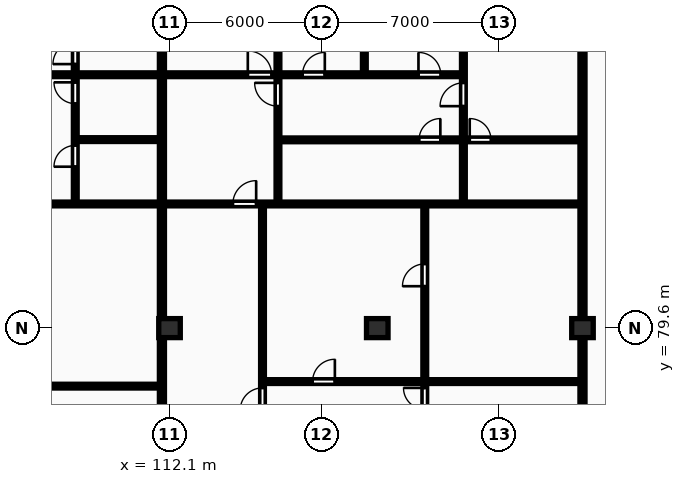
"""IFC4 building model, lengths in metres.
Left out: names, types, materials, properties, quantities, classifications, styles, units other than length and angle.
Written with IfcOpenShell. Run it as: python <this file> out.ifc"""

import sys

from ifc_helpers import new_model, si_unit, direction, frame, frame_2d, origin, origin_2d, place, context, subcontext, project, spatial, rectangle, extrude, element, fill, save


model = new_model("IFC4")
c1 = context("Model", 3, precision=1e-05, world=origin(), true_north=direction((0.0, 1.0)))
c2 = subcontext(c1, "Body", "Model", "MODEL_VIEW")
j1 = project(units=[si_unit("LENGTHUNIT", "METRE"), si_unit("PLANEANGLEUNIT", "RADIAN")], contexts=[c1])
p1 = place(None, origin())
s1 = spatial("IfcSite", under=j1, at=p1, CompositionType="ELEMENT")
p2 = place(p1, origin())
s2 = spatial("IfcBuilding", under=s1, at=p2, CompositionType="ELEMENT")
p3 = place(p2, frame((0.0, 0.0, 210.85)))
s3 = spatial("IfcBuildingStorey", under=s2, at=p3, CompositionType="ELEMENT", Elevation=210.85)
for number, where, z_axis, x_axis in (
    (1, (112.1, 79.6, 0.0), (0.0, 0.0, 1.0), (1.0, 0.0, 0.0)),
    (2, (120.3, 79.6, 0.0), (0.0, 0.0, 1.0), (1.0, 0.0, 0.0)),
    (3, (128.4, 79.6, 0.0), (0.0, 0.0, 1.0), (1.0, 0.0, 0.0)),
):
    element("IfcColumn", number, at=place(p3, frame(where, z_axis=z_axis, x_axis=x_axis)), inside=s3, PredefinedType="COLUMN", context=c2, shape_type="SweptSolid", body=[
        extrude(rectangle(XDim=0.85, YDim=0.75, at=origin_2d()), origin(), (0.0, 0.0, 1.0), 3.25),
    ])
p4 = place(p3, frame((128.4, 70.18, 0.0), z_axis=(0.0, 0.0, 1.0), x_axis=(0.0, 1.0, 0.0)))
e4 = element("IfcWall", 4, at=p4, inside=s3, PredefinedType="PARTITIONING", context=c2, shape_type="SweptSolid", body=[
    extrude(rectangle(XDim=24.32, YDim=0.2, at=frame_2d((12.16, 0.0))), origin(), (0.0, 0.0, 1.0), 2.277),
])
p5 = place(p3, frame((111.8, 70.18, 0.0), z_axis=(0.0, 0.0, 1.0), x_axis=(0.0, 1.0, 0.0)))
e5 = element("IfcWall", 5, at=p5, inside=s3, PredefinedType="PARTITIONING", context=c2, shape_type="SweptSolid", body=[
    extrude(rectangle(XDim=24.32, YDim=0.2, at=frame_2d((12.16, 0.0))), origin(), (0.0, 0.0, 1.0), 2.97),
])
p6 = place(p3, frame((102.766, 77.31, 0.0), z_axis=(0.0, 0.0, 1.0), x_axis=(1.0, 0.0, 0.0)))
e6 = element("IfcWall", 6, at=p6, inside=s3, PredefinedType="PARTITIONING", context=c2, shape_type="SweptSolid", body=[
    extrude(rectangle(XDim=8.954, YDim=0.15, at=frame_2d((4.477, 0.0))), origin(), (0.0, 0.0, 1.0), 2.97),
])
p7 = place(p6, frame((3.257, 0.0, 0.0)))
e7 = element("IfcOpeningElement", 7, at=p7, cuts=e6, PredefinedType="OPENING", context=c2, shape_type="SweptSolid", body=[
    extrude(rectangle(XDim=0.88, YDim=2.06, at=frame_2d((0.44, 1.03))), frame((0.0, 0.085, 0.0), z_axis=(0.0, -1.0, 0.0), x_axis=(1.0, 0.0, 0.0)), (0.0, 0.0, 1.0), 0.17),
])
p8 = place(p3, frame((108.44, 87.04, 0.0), z_axis=(0.0, 0.0, 1.0), x_axis=(1.0, 0.0, 0.0)))
e8 = element("IfcWall", 8, at=p8, inside=s3, PredefinedType="PARTITIONING", context=c2, shape_type="SweptSolid", body=[
    extrude(rectangle(XDim=3.28, YDim=0.15, at=frame_2d((1.64, 0.0))), origin(), (0.0, 0.0, 1.0), 2.97),
])
p9 = place(p3, frame((108.38, 84.54, 0.0), z_axis=(0.0, 0.0, 1.0), x_axis=(0.0, 1.0, 0.0)))
e9 = element("IfcWall", 9, at=p9, inside=s3, PredefinedType="PARTITIONING", context=c2, shape_type="SweptSolid", body=[
    extrude(rectangle(XDim=9.96, YDim=0.15, at=frame_2d((4.98, 0.0))), origin(), (0.0, 0.0, 1.0), 2.97),
])
p10 = place(p9, frame((1.43, 0.0, 0.0)))
e10 = element("IfcOpeningElement", 10, at=p10, cuts=e9, PredefinedType="OPENING", context=c2, shape_type="SweptSolid", body=[
    extrude(rectangle(XDim=0.84, YDim=2.04, at=frame_2d((0.42, 1.02))), frame((0.0, 0.085, 0.0), z_axis=(0.0, -1.0, 0.0), x_axis=(1.0, 0.0, 0.0)), (0.0, 0.0, 1.0), 0.17),
])
p11 = place(p9, frame((3.92, 0.0, 0.0)))
e11 = element("IfcOpeningElement", 11, at=p11, cuts=e9, PredefinedType="OPENING", context=c2, shape_type="SweptSolid", body=[
    extrude(rectangle(XDim=0.84, YDim=2.04, at=frame_2d((0.42, 1.02))), frame((0.0, 0.085, 0.0), z_axis=(0.0, -1.0, 0.0), x_axis=(1.0, 0.0, 0.0)), (0.0, 0.0, 1.0), 0.17),
])
p12 = place(p9, frame((5.48, 0.0, 0.0)))
e12 = element("IfcOpeningElement", 12, at=p12, cuts=e9, PredefinedType="OPENING", context=c2, shape_type="SweptSolid", body=[
    extrude(rectangle(XDim=0.88, YDim=2.06, at=frame_2d((0.44, 1.03))), frame((0.0, 0.085, 0.0), z_axis=(0.0, -1.0, 0.0), x_axis=(1.0, 0.0, 0.0)), (0.0, 0.0, 1.0), 0.17),
])
p13 = place(p3, frame((98.816, 84.5, 0.0), z_axis=(0.0, 0.0, 1.0), x_axis=(1.0, 0.0, 0.0)))
e13 = element("IfcWall", 13, at=p13, inside=s3, PredefinedType="PARTITIONING", context=c2, shape_type="SweptSolid", body=[
    extrude(rectangle(XDim=12.904, YDim=0.15, at=frame_2d((6.452, 0.0))), origin(), (0.0, 0.0, 1.0), 2.97),
])
p14 = place(p13, frame((2.72, 0.0, 0.0)))
e14 = element("IfcOpeningElement", 14, at=p14, cuts=e13, PredefinedType="OPENING", context=c2, shape_type="SweptSolid", body=[
    extrude(rectangle(XDim=0.92, YDim=2.08, at=frame_2d((0.46, 1.04))), frame((0.0, 0.085, 0.0), z_axis=(0.0, -1.0, 0.0), x_axis=(1.0, 0.0, 0.0)), (0.0, 0.0, 1.0), 0.17),
])
p15 = place(p3, frame((98.816, 89.6, 0.0), z_axis=(0.0, 0.0, 1.0), x_axis=(1.0, 0.0, 0.0)))
e15 = element("IfcWall", 15, at=p15, inside=s3, PredefinedType="PARTITIONING", context=c2, shape_type="SweptSolid", body=[
    extrude(rectangle(XDim=12.904, YDim=0.15, at=frame_2d((6.452, 0.0))), origin(), (0.0, 0.0, 1.0), 2.97),
])
p16 = place(p15, frame((5.982, 0.0, 0.0)))
e16 = element("IfcOpeningElement", 16, at=p16, cuts=e15, PredefinedType="OPENING", context=c2, shape_type="SweptSolid", body=[
    extrude(rectangle(XDim=0.94, YDim=2.1, at=frame_2d((0.47, 1.05))), frame((0.0, 0.085, 0.0), z_axis=(0.0, -1.0, 0.0), x_axis=(1.0, 0.0, 0.0)), (0.0, 0.0, 1.0), 0.17),
])
p17 = place(p3, frame((122.175, 70.16, 0.0), z_axis=(0.0, 0.0, 1.0), x_axis=(0.0, 1.0, 0.0)))
e17 = element("IfcWall", 17, at=p17, inside=s3, PredefinedType="PARTITIONING", context=c2, shape_type="SweptSolid", body=[
    extrude(rectangle(XDim=14.3, YDim=0.15, at=frame_2d((7.15, 0.0))), origin(), (0.0, 0.0, 1.0), 2.97),
])
p18 = place(p17, frame((6.24, 0.0, 0.0)))
e18 = element("IfcOpeningElement", 18, at=p18, cuts=e17, PredefinedType="OPENING", context=c2, shape_type="SweptSolid", body=[
    extrude(rectangle(XDim=0.84, YDim=2.04, at=frame_2d((0.42, 1.02))), frame((0.0, 0.085, 0.0), z_axis=(0.0, -1.0, 0.0), x_axis=(1.0, 0.0, 0.0)), (0.0, 0.0, 1.0), 0.17),
])
p19 = place(p17, frame((11.094, 0.0, 0.0)))
e19 = element("IfcOpeningElement", 19, at=p19, cuts=e17, PredefinedType="OPENING", context=c2, shape_type="SweptSolid", body=[
    extrude(rectangle(XDim=0.88, YDim=2.06, at=frame_2d((0.44, 1.03))), frame((0.0, 0.085, 0.0), z_axis=(0.0, -1.0, 0.0), x_axis=(1.0, 0.0, 0.0)), (0.0, 0.0, 1.0), 0.17),
])
p20 = place(p3, frame((115.83, 77.49, 0.0), z_axis=(0.0, 0.0, 1.0), x_axis=(1.0, 0.0, 0.0)))
e20 = element("IfcWall", 20, at=p20, inside=s3, PredefinedType="PARTITIONING", context=c2, shape_type="SweptSolid", body=[
    extrude(rectangle(XDim=12.49, YDim=0.15, at=frame_2d((6.245, 0.0))), origin(), (0.0, 0.0, 1.0), 2.97),
])
p21 = place(p20, frame((1.917, 0.0, 0.0)))
e21 = element("IfcOpeningElement", 21, at=p21, cuts=e20, PredefinedType="OPENING", context=c2, shape_type="SweptSolid", body=[
    extrude(rectangle(XDim=0.88, YDim=2.06, at=frame_2d((0.44, 1.03))), frame((0.0, 0.085, 0.0), z_axis=(0.0, -1.0, 0.0), x_axis=(1.0, 0.0, 0.0)), (0.0, 0.0, 1.0), 0.17),
])
p22 = place(p3, frame((115.77, 70.16, 0.0), z_axis=(0.0, 0.0, 1.0), x_axis=(0.0, 1.0, 0.0)))
e22 = element("IfcWall", 22, at=p22, inside=s3, PredefinedType="PARTITIONING", context=c2, shape_type="SweptSolid", body=[
    extrude(rectangle(XDim=14.3, YDim=0.15, at=frame_2d((7.15, 0.0))), origin(), (0.0, 0.0, 1.0), 2.97),
])
p23 = place(p22, frame((6.2, 0.0, 0.0)))
e23 = element("IfcOpeningElement", 23, at=p23, cuts=e22, PredefinedType="OPENING", context=c2, shape_type="SweptSolid", body=[
    extrude(rectangle(XDim=0.88, YDim=2.06, at=frame_2d((0.44, 1.03))), frame((0.0, 0.085, 0.0), z_axis=(0.0, -1.0, 0.0), x_axis=(1.0, 0.0, 0.0)), (0.0, 0.0, 1.0), 0.17),
])
p24 = place(p3, frame((119.79, 89.68, 0.0), z_axis=(0.0, 0.0, 1.0), x_axis=(0.0, 1.0, 0.0)))
e24 = element("IfcWall", 24, at=p24, inside=s3, PredefinedType="PARTITIONING", context=c2, shape_type="SweptSolid", body=[
    extrude(rectangle(XDim=4.82, YDim=0.15, at=frame_2d((2.41, 0.0))), origin(), (0.0, 0.0, 1.0), 2.97),
])
p25 = place(p3, frame((116.38, 84.54, 0.0), z_axis=(0.0, 0.0, 1.0), x_axis=(0.0, 1.0, 0.0)))
e25 = element("IfcWall", 25, at=p25, inside=s3, PredefinedType="PARTITIONING", context=c2, shape_type="SweptSolid", body=[
    extrude(rectangle(XDim=9.96, YDim=0.15, at=frame_2d((4.98, 0.0))), origin(), (0.0, 0.0, 1.0), 2.97),
])
p26 = place(p25, frame((3.82, 0.0, 0.0)))
e26 = element("IfcOpeningElement", 26, at=p26, cuts=e25, PredefinedType="OPENING", context=c2, shape_type="SweptSolid", body=[
    extrude(rectangle(XDim=0.92, YDim=2.08, at=frame_2d((0.46, 1.04))), frame((0.0, 0.085, 0.0), z_axis=(0.0, -1.0, 0.0), x_axis=(1.0, 0.0, 0.0)), (0.0, 0.0, 1.0), 0.17),
])
p27 = place(p3, frame((123.699, 84.54, 0.0), z_axis=(0.0, 0.0, 1.0), x_axis=(0.0, 1.0, 0.0)))
e27 = element("IfcWall", 27, at=p27, inside=s3, PredefinedType="PARTITIONING", context=c2, shape_type="SweptSolid", body=[
    extrude(rectangle(XDim=2.47, YDim=0.15, at=frame_2d((1.235, 0.0))), origin(), (0.0, 0.0, 1.0), 2.97),
])
p28 = place(p3, frame((123.699, 87.05, 0.0), z_axis=(0.0, 0.0, 1.0), x_axis=(0.0, 1.0, 0.0)))
e28 = element("IfcWall", 28, at=p28, inside=s3, PredefinedType="PARTITIONING", context=c2, shape_type="SweptSolid", body=[
    extrude(rectangle(XDim=7.45, YDim=0.15, at=frame_2d((3.725, 0.0))), origin(), (0.0, 0.0, 1.0), 2.97),
])
p29 = place(p28, frame((1.31, 0.0, 0.0)))
e29 = element("IfcOpeningElement", 29, at=p29, cuts=e28, PredefinedType="OPENING", context=c2, shape_type="SweptSolid", body=[
    extrude(rectangle(XDim=0.92, YDim=2.08, at=frame_2d((0.46, 1.04))), frame((0.0, 0.085, 0.0), z_axis=(0.0, -1.0, 0.0), x_axis=(1.0, 0.0, 0.0)), (0.0, 0.0, 1.0), 0.17),
])
p30 = place(p3, frame((116.42, 87.03, 0.0), z_axis=(0.0, 0.0, 1.0), x_axis=(1.0, 0.0, 0.0)))
e30 = element("IfcWall", 30, at=p30, inside=s3, PredefinedType="PARTITIONING", context=c2, shape_type="SweptSolid", body=[
    extrude(rectangle(XDim=11.9, YDim=0.15, at=frame_2d((5.95, 0.0))), origin(), (0.0, 0.0, 1.0), 2.97),
])
p31 = place(p30, frame((5.53, 0.0, 0.0)))
e31 = element("IfcOpeningElement", 31, at=p31, cuts=e30, PredefinedType="OPENING", context=c2, shape_type="SweptSolid", body=[
    extrude(rectangle(XDim=0.84, YDim=2.04, at=frame_2d((0.42, 1.02))), frame((0.0, 0.085, 0.0), z_axis=(0.0, -1.0, 0.0), x_axis=(1.0, 0.0, 0.0)), (0.0, 0.0, 1.0), 0.17),
])
p32 = place(p30, frame((7.529, 0.0, 0.0)))
e32 = element("IfcOpeningElement", 32, at=p32, cuts=e30, PredefinedType="OPENING", context=c2, shape_type="SweptSolid", body=[
    extrude(rectangle(XDim=0.84, YDim=2.04, at=frame_2d((0.42, 1.02))), frame((0.0, 0.085, 0.0), z_axis=(0.0, -1.0, 0.0), x_axis=(1.0, 0.0, 0.0)), (0.0, 0.0, 1.0), 0.17),
])
p33 = place(p3, frame((111.88, 84.5, 0.0), z_axis=(0.0, 0.0, 1.0), x_axis=(1.0, 0.0, 0.0)))
e33 = element("IfcWall", 33, at=p33, inside=s3, PredefinedType="PARTITIONING", context=c2, shape_type="SweptSolid", body=[
    extrude(rectangle(XDim=16.44, YDim=0.15, at=frame_2d((8.22, 0.0))), origin(), (0.0, 0.0, 1.0), 2.97),
])
p34 = place(p33, frame((2.72, 0.0, 0.0)))
e34 = element("IfcOpeningElement", 34, at=p34, cuts=e33, PredefinedType="OPENING", context=c2, shape_type="SweptSolid", body=[
    extrude(rectangle(XDim=0.92, YDim=2.08, at=frame_2d((0.46, 1.04))), frame((0.0, 0.085, 0.0), z_axis=(0.0, -1.0, 0.0), x_axis=(1.0, 0.0, 0.0)), (0.0, 0.0, 1.0), 0.17),
])
p35 = place(p3, frame((111.88, 89.6, 0.0), z_axis=(0.0, 0.0, 1.0), x_axis=(1.0, 0.0, 0.0)))
e35 = element("IfcWall", 35, at=p35, inside=s3, PredefinedType="PARTITIONING", context=c2, shape_type="SweptSolid", body=[
    extrude(rectangle(XDim=11.819, YDim=0.15, at=frame_2d((5.91, 0.0))), origin(), (0.0, 0.0, 1.0), 2.97),
])
p36 = place(p35, frame((3.31, 0.0, 0.0)))
e36 = element("IfcOpeningElement", 36, at=p36, cuts=e35, PredefinedType="OPENING", context=c2, shape_type="SweptSolid", body=[
    extrude(rectangle(XDim=0.94, YDim=2.1, at=frame_2d((0.47, 1.05))), frame((0.0, 0.085, 0.0), z_axis=(0.0, -1.0, 0.0), x_axis=(1.0, 0.0, 0.0)), (0.0, 0.0, 1.0), 0.17),
])
p37 = place(p35, frame((5.469, 0.0, 0.0)))
e37 = element("IfcOpeningElement", 37, at=p37, cuts=e35, PredefinedType="OPENING", context=c2, shape_type="SweptSolid", body=[
    extrude(rectangle(XDim=0.88, YDim=2.06, at=frame_2d((0.44, 1.03))), frame((0.0, 0.085, 0.0), z_axis=(0.0, -1.0, 0.0), x_axis=(1.0, 0.0, 0.0)), (0.0, 0.0, 1.0), 0.17),
])
p38 = place(p35, frame((10.046, 0.0, 0.0)))
e38 = element("IfcOpeningElement", 38, at=p38, cuts=e35, PredefinedType="OPENING", context=c2, shape_type="SweptSolid", body=[
    extrude(rectangle(XDim=0.88, YDim=2.06, at=frame_2d((0.44, 1.03))), frame((0.0, 0.085, 0.0), z_axis=(0.0, -1.0, 0.0), x_axis=(1.0, 0.0, 0.0)), (0.0, 0.0, 1.0), 0.17),
])
p39 = place(p10, origin())
e39 = element("IfcDoor", 39, at=p39, inside=s3, OperationType="SINGLE_SWING_LEFT", PredefinedType="DOOR", context=c2, shape_type="SweptSolid", body=[
    extrude(rectangle(XDim=0.84, YDim=2.04, at=frame_2d((0.42, 1.02))), frame((0.0, 0.025, 0.0), z_axis=(0.0, -1.0, 0.0), x_axis=(1.0, 0.0, 0.0)), (0.0, 0.0, 1.0), 0.05),
])
fill(e10, e39)
p40 = place(p11, origin())
e40 = element("IfcDoor", 40, at=p40, inside=s3, OperationType="SINGLE_SWING_RIGHT", PredefinedType="DOOR", context=c2, shape_type="SweptSolid", body=[
    extrude(rectangle(XDim=0.84, YDim=2.04, at=frame_2d((0.42, 1.02))), frame((0.0, 0.025, 0.0), z_axis=(0.0, -1.0, 0.0), x_axis=(1.0, 0.0, 0.0)), (0.0, 0.0, 1.0), 0.05),
])
fill(e11, e40)
p41 = place(p12, origin())
e41 = element("IfcDoor", 41, at=p41, inside=s3, OperationType="SINGLE_SWING_LEFT", PredefinedType="DOOR", context=c2, shape_type="SweptSolid", body=[
    extrude(rectangle(XDim=0.88, YDim=2.06, at=frame_2d((0.44, 1.03))), frame((0.0, 0.025, 0.0), z_axis=(0.0, -1.0, 0.0), x_axis=(1.0, 0.0, 0.0)), (0.0, 0.0, 1.0), 0.05),
])
fill(e12, e41)
p42 = place(p18, origin())
e42 = element("IfcDoor", 42, at=p42, inside=s3, OperationType="SINGLE_SWING_RIGHT", PredefinedType="DOOR", context=c2, shape_type="SweptSolid", body=[
    extrude(rectangle(XDim=0.84, YDim=2.04, at=frame_2d((0.42, 1.02))), frame((0.0, 0.025, 0.0), z_axis=(0.0, -1.0, 0.0), x_axis=(1.0, 0.0, 0.0)), (0.0, 0.0, 1.0), 0.05),
])
fill(e18, e42)
p43 = place(p19, origin())
e43 = element("IfcDoor", 43, at=p43, inside=s3, OperationType="SINGLE_SWING_LEFT", PredefinedType="DOOR", context=c2, shape_type="SweptSolid", body=[
    extrude(rectangle(XDim=0.88, YDim=2.06, at=frame_2d((0.44, 1.03))), frame((0.0, 0.025, 0.0), z_axis=(0.0, -1.0, 0.0), x_axis=(1.0, 0.0, 0.0)), (0.0, 0.0, 1.0), 0.05),
])
fill(e19, e43)
p44 = place(p21, origin())
e44 = element("IfcDoor", 44, at=p44, inside=s3, OperationType="SINGLE_SWING_RIGHT", PredefinedType="DOOR", context=c2, shape_type="SweptSolid", body=[
    extrude(rectangle(XDim=0.88, YDim=2.06, at=frame_2d((0.44, 1.03))), frame((0.0, 0.025, 0.0), z_axis=(0.0, -1.0, 0.0), x_axis=(1.0, 0.0, 0.0)), (0.0, 0.0, 1.0), 0.05),
])
fill(e21, e44)
p45 = place(p23, origin())
e45 = element("IfcDoor", 45, at=p45, inside=s3, OperationType="SINGLE_SWING_LEFT", PredefinedType="DOOR", context=c2, shape_type="SweptSolid", body=[
    extrude(rectangle(XDim=0.88, YDim=2.06, at=frame_2d((0.44, 1.03))), frame((0.0, 0.025, 0.0), z_axis=(0.0, -1.0, 0.0), x_axis=(1.0, 0.0, 0.0)), (0.0, 0.0, 1.0), 0.05),
])
fill(e23, e45)
p46 = place(p26, origin())
e46 = element("IfcDoor", 46, at=p46, inside=s3, OperationType="SINGLE_SWING_RIGHT", PredefinedType="DOOR", context=c2, shape_type="SweptSolid", body=[
    extrude(rectangle(XDim=0.92, YDim=2.08, at=frame_2d((0.46, 1.04))), frame((0.0, 0.025, 0.0), z_axis=(0.0, -1.0, 0.0), x_axis=(1.0, 0.0, 0.0)), (0.0, 0.0, 1.0), 0.05),
])
fill(e26, e46)
p47 = place(p29, origin())
e47 = element("IfcDoor", 47, at=p47, inside=s3, OperationType="SINGLE_SWING_LEFT", PredefinedType="DOOR", context=c2, shape_type="SweptSolid", body=[
    extrude(rectangle(XDim=0.92, YDim=2.08, at=frame_2d((0.46, 1.04))), frame((0.0, 0.025, 0.0), z_axis=(0.0, -1.0, 0.0), x_axis=(1.0, 0.0, 0.0)), (0.0, 0.0, 1.0), 0.05),
])
fill(e29, e47)
p48 = place(p31, origin())
e48 = element("IfcDoor", 48, at=p48, inside=s3, OperationType="SINGLE_SWING_RIGHT", PredefinedType="DOOR", context=c2, shape_type="SweptSolid", body=[
    extrude(rectangle(XDim=0.84, YDim=2.04, at=frame_2d((0.42, 1.02))), frame((0.0, 0.025, 0.0), z_axis=(0.0, -1.0, 0.0), x_axis=(1.0, 0.0, 0.0)), (0.0, 0.0, 1.0), 0.05),
])
fill(e31, e48)
p49 = place(p32, origin())
e49 = element("IfcDoor", 49, at=p49, inside=s3, OperationType="SINGLE_SWING_LEFT", PredefinedType="DOOR", context=c2, shape_type="SweptSolid", body=[
    extrude(rectangle(XDim=0.84, YDim=2.04, at=frame_2d((0.42, 1.02))), frame((0.0, 0.025, 0.0), z_axis=(0.0, -1.0, 0.0), x_axis=(1.0, 0.0, 0.0)), (0.0, 0.0, 1.0), 0.05),
])
fill(e32, e49)
p50 = place(p34, origin())
e50 = element("IfcDoor", 50, at=p50, inside=s3, OperationType="SINGLE_SWING_RIGHT", PredefinedType="DOOR", context=c2, shape_type="SweptSolid", body=[
    extrude(rectangle(XDim=0.92, YDim=2.08, at=frame_2d((0.46, 1.04))), frame((0.0, 0.025, 0.0), z_axis=(0.0, -1.0, 0.0), x_axis=(1.0, 0.0, 0.0)), (0.0, 0.0, 1.0), 0.05),
])
fill(e34, e50)
p51 = place(p36, origin())
e51 = element("IfcDoor", 51, at=p51, inside=s3, OperationType="SINGLE_SWING_LEFT", PredefinedType="DOOR", context=c2, shape_type="SweptSolid", body=[
    extrude(rectangle(XDim=0.94, YDim=2.1, at=frame_2d((0.47, 1.05))), frame((0.0, 0.025, 0.0), z_axis=(0.0, -1.0, 0.0), x_axis=(1.0, 0.0, 0.0)), (0.0, 0.0, 1.0), 0.05),
])
fill(e36, e51)
p52 = place(p37, origin())
e52 = element("IfcDoor", 52, at=p52, inside=s3, OperationType="SINGLE_SWING_RIGHT", PredefinedType="DOOR", context=c2, shape_type="SweptSolid", body=[
    extrude(rectangle(XDim=0.88, YDim=2.06, at=frame_2d((0.44, 1.03))), frame((0.0, 0.025, 0.0), z_axis=(0.0, -1.0, 0.0), x_axis=(1.0, 0.0, 0.0)), (0.0, 0.0, 1.0), 0.05),
])
fill(e37, e52)
p53 = place(p38, origin())
e53 = element("IfcDoor", 53, at=p53, inside=s3, OperationType="SINGLE_SWING_LEFT", PredefinedType="DOOR", context=c2, shape_type="SweptSolid", body=[
    extrude(rectangle(XDim=0.88, YDim=2.06, at=frame_2d((0.44, 1.03))), frame((0.0, 0.025, 0.0), z_axis=(0.0, -1.0, 0.0), x_axis=(1.0, 0.0, 0.0)), (0.0, 0.0, 1.0), 0.05),
])
fill(e38, e53)
save(model, sys.argv[1])
